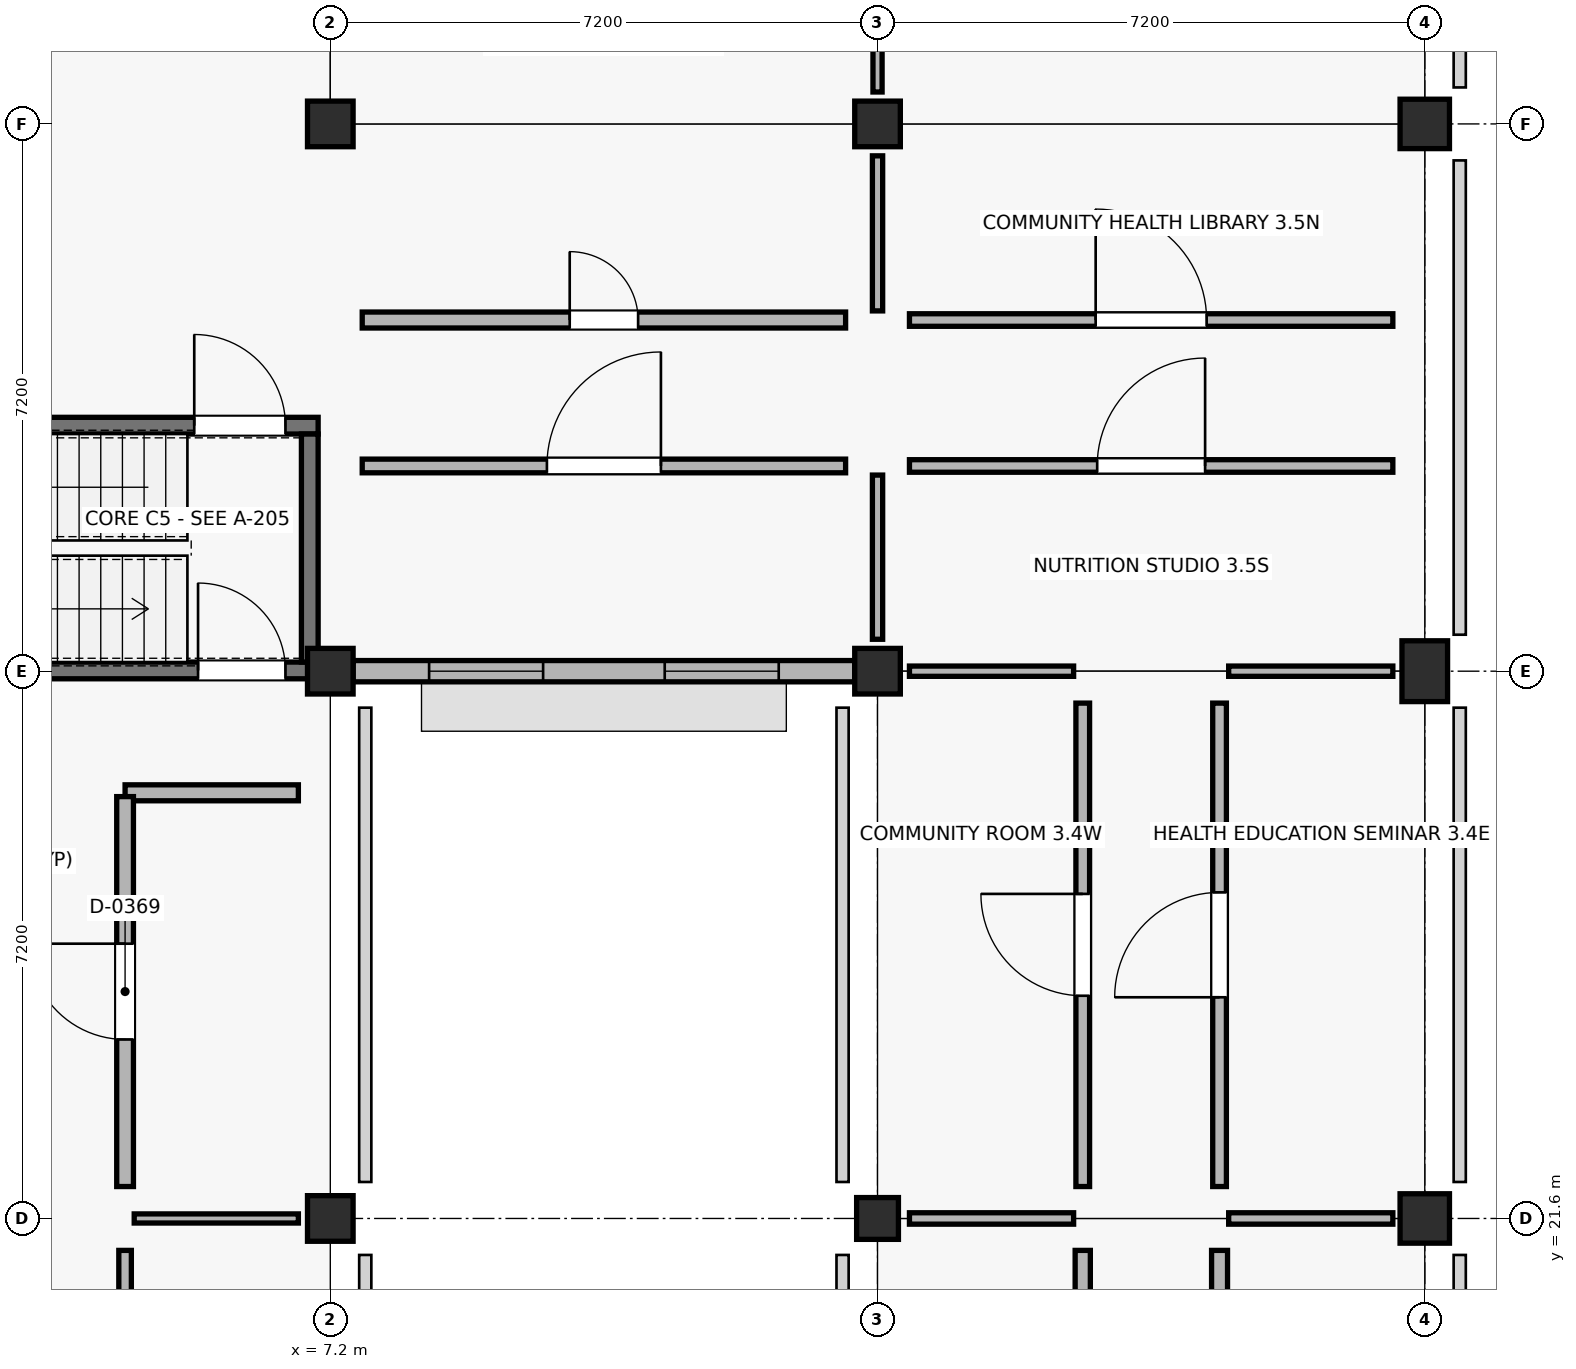
"""IFC4 building model, lengths in metres.
Left out: names, types, materials, properties, quantities, classifications, styles, units other than length and angle.
Written with IfcOpenShell. Run it as: python <this file> out.ifc"""

import sys

from ifc_helpers import new_model, si_unit, direction, frame, frame_2d, origin, origin_2d, place, context, subcontext, project, spatial, rectangle, circle, extrude, element, fill, save


model = new_model("IFC4")
c1 = context("Model", 3, precision=1e-05, world=origin(), true_north=direction((0.0, 1.0)))
c2 = subcontext(c1, "Body", "Model", "MODEL_VIEW")
j1 = project(units=[si_unit("LENGTHUNIT", "METRE"), si_unit("PLANEANGLEUNIT", "RADIAN")], contexts=[c1])
p1 = place(None, origin())
s1 = spatial("IfcSite", under=j1, at=p1, CompositionType="ELEMENT")
p2 = place(p1, origin())
s2 = spatial("IfcBuilding", under=s1, at=p2, CompositionType="ELEMENT")
p3 = place(p2, frame((0.0, 0.0, 4.5)))
s3 = spatial("IfcBuildingStorey", under=s2, at=p3, CompositionType="ELEMENT", Elevation=4.5)
for number, where, z_axis, x_axis in (
    (1, (7.2, 21.6, 0.0), (0.0, 0.0, 1.0), (1.0, 0.0, 0.0)),
    (2, (7.2, 28.8, 0.0), (0.0, 0.0, 1.0), (1.0, 0.0, 0.0)),
    (3, (7.2, 36.0, 0.0), (0.0, 0.0, 1.0), (1.0, 0.0, 0.0)),
):
    element("IfcColumn", number, at=place(p3, frame(where, z_axis=z_axis, x_axis=x_axis)), inside=s3, PredefinedType="COLUMN", context=c2, shape_type="SweptSolid", body=[
        extrude(rectangle(XDim=0.6, YDim=0.6, at=origin_2d()), origin(), (0.0, 0.0, 1.0), 4.5),
    ])
p4 = place(p3, frame((14.4, 21.6, 0.0), z_axis=(0.0, 0.0, 1.0), x_axis=(1.0, 0.0, 0.0)))
e4 = element("IfcColumn", 4, at=p4, inside=s3, PredefinedType="COLUMN", context=c2, shape_type="SweptSolid", body=[
    extrude(rectangle(XDim=0.55, YDim=0.55, at=origin_2d()), origin(), (0.0, 0.0, 1.0), 4.5),
])
for number, where, z_axis, x_axis in (
    (5, (14.4, 28.8, 0.0), (0.0, 0.0, 1.0), (1.0, 0.0, 0.0)),
    (6, (14.4, 36.0, 0.0), (0.0, 0.0, 1.0), (1.0, 0.0, 0.0)),
):
    element("IfcColumn", number, at=place(p3, frame(where, z_axis=z_axis, x_axis=x_axis)), inside=s3, PredefinedType="COLUMN", context=c2, shape_type="SweptSolid", body=[
        extrude(rectangle(XDim=0.6, YDim=0.6, at=origin_2d()), origin(), (0.0, 0.0, 1.0), 4.5),
    ])
p5 = place(p3, frame((21.6, 21.6, 0.0), z_axis=(0.0, 0.0, 1.0), x_axis=(1.0, 0.0, 0.0)))
e7 = element("IfcColumn", 7, at=p5, inside=s3, PredefinedType="COLUMN", context=c2, shape_type="SweptSolid", body=[
    extrude(circle(Radius=0.325, at=origin_2d()), origin(), (0.0, 0.0, 1.0), 4.5),
])
p6 = place(p3, frame((21.6, 28.8, 0.0), z_axis=(0.0, 0.0, 1.0), x_axis=(1.0, 0.0, 0.0)))
e8 = element("IfcColumn", 8, at=p6, inside=s3, PredefinedType="PILASTER", context=c2, shape_type="SweptSolid", body=[
    extrude(rectangle(XDim=0.6, YDim=0.8, at=origin_2d()), origin(), (0.0, 0.0, 1.0), 4.5),
])
p7 = place(p3, frame((21.6, 36.0, 0.0), z_axis=(0.0, 0.0, 1.0), x_axis=(1.0, 0.0, 0.0)))
e9 = element("IfcColumn", 9, at=p7, inside=s3, PredefinedType="COLUMN", context=c2, shape_type="SweptSolid", body=[
    extrude(circle(Radius=0.325, at=origin_2d()), origin(), (0.0, 0.0, 1.0), 4.5),
])
p8 = place(p3, frame((7.5, 28.8, 0.0), z_axis=(0.0, 0.0, 1.0), x_axis=(1.0, 0.0, 0.0)))
e10 = element("IfcWall", 10, at=p8, inside=s3, PredefinedType="STANDARD", context=c2, shape_type="SweptSolid", body=[
    extrude(rectangle(XDim=6.6, YDim=0.28, at=frame_2d((3.3, 0.0))), origin(), (0.0, 0.0, 1.0), 3.47),
])
p9 = place(p8, frame((1.0, 0.0, 0.9)))
e11 = element("IfcOpeningElement", 11, at=p9, cuts=e10, PredefinedType="OPENING", context=c2, shape_type="SweptSolid", body=[
    extrude(rectangle(XDim=1.5, YDim=1.5, at=frame_2d((0.75, 0.75))), frame((0.0, 0.15, 0.0), z_axis=(0.0, -1.0, 0.0), x_axis=(1.0, 0.0, 0.0)), (0.0, 0.0, 1.0), 0.3),
])
p10 = place(p8, frame((4.1, 0.0, 0.9)))
e12 = element("IfcOpeningElement", 12, at=p10, cuts=e10, PredefinedType="OPENING", context=c2, shape_type="SweptSolid", body=[
    extrude(rectangle(XDim=1.5, YDim=1.5, at=frame_2d((0.75, 0.75))), frame((0.0, 0.15, 0.0), z_axis=(0.0, -1.0, 0.0), x_axis=(1.0, 0.0, 0.0)), (0.0, 0.0, 1.0), 0.3),
])
p11 = place(p3, frame((0.16, 28.81, 0.0), z_axis=(0.0, 0.0, 1.0), x_axis=(1.0, 0.0, 0.0)))
e13 = element("IfcWall", 13, at=p11, inside=s3, PredefinedType="SHEAR", context=c2, shape_type="SweptSolid", body=[
    extrude(rectangle(XDim=6.88, YDim=0.22, at=frame_2d((3.44, 0.0))), origin(), (0.0, 0.0, 1.0), 4.22),
])
p12 = place(p11, frame((5.3, 0.0, 0.0)))
e14 = element("IfcOpeningElement", 14, at=p12, cuts=e13, PredefinedType="OPENING", context=c2, shape_type="SweptSolid", body=[
    extrude(rectangle(XDim=1.15, YDim=2.15, at=frame_2d((0.575, 1.075))), frame((0.0, 0.12, 0.0), z_axis=(0.0, -1.0, 0.0), x_axis=(1.0, 0.0, 0.0)), (0.0, 0.0, 1.0), 0.24),
])
p13 = place(p3, frame((0.16, 32.03, 0.0), z_axis=(0.0, 0.0, 1.0), x_axis=(1.0, 0.0, 0.0)))
e15 = element("IfcWall", 15, at=p13, inside=s3, PredefinedType="SHEAR", context=c2, shape_type="SweptSolid", body=[
    extrude(rectangle(XDim=6.88, YDim=0.22, at=frame_2d((3.44, 0.0))), origin(), (0.0, 0.0, 1.0), 4.22),
])
p14 = place(p13, frame((5.25, 0.0, 0.0)))
e16 = element("IfcOpeningElement", 16, at=p14, cuts=e15, PredefinedType="OPENING", context=c2, shape_type="SweptSolid", body=[
    extrude(rectangle(XDim=1.2, YDim=2.15, at=frame_2d((0.6, 1.075))), frame((0.0, 0.12, 0.0), z_axis=(0.0, -1.0, 0.0), x_axis=(1.0, 0.0, 0.0)), (0.0, 0.0, 1.0), 0.24),
])
p15 = place(p3, frame((6.93, 28.92, 0.0), z_axis=(0.0, 0.0, 1.0), x_axis=(0.0, 1.0, 0.0)))
e17 = element("IfcWall", 17, at=p15, inside=s3, PredefinedType="SHEAR", context=c2, shape_type="SweptSolid", body=[
    extrude(rectangle(XDim=3.0, YDim=0.22, at=frame_2d((1.5, 0.0))), origin(), (0.0, 0.0, 1.0), 4.22),
])
p16 = place(p3, frame((4.5, 14.82, 0.0), z_axis=(0.0, 0.0, 1.0), x_axis=(0.0, 1.0, 0.0)))
e18 = element("IfcWall", 18, at=p16, inside=s3, PredefinedType="PARTITIONING", context=c2, shape_type="SweptSolid", body=[
    extrude(rectangle(XDim=6.36, YDim=0.165, at=frame_2d((3.18, 0.0))), origin(), (0.0, 0.0, 1.0), 3.36),
])
p17 = place(p16, frame((2.59, 0.0, 0.0)))
e19 = element("IfcOpeningElement", 19, at=p17, cuts=e18, PredefinedType="OPENING", context=c2, shape_type="SweptSolid", body=[
    extrude(rectangle(XDim=1.18, YDim=2.04, at=frame_2d((0.59, 1.02))), frame((0.0, 0.093, 0.0), z_axis=(0.0, -1.0, 0.0), x_axis=(1.0, 0.0, 0.0)), (0.0, 0.0, 1.0), 0.185),
])
p18 = place(p3, frame((4.62, 21.6, 0.0), z_axis=(0.0, 0.0, 1.0), x_axis=(1.0, 0.0, 0.0)))
e20 = element("IfcWall", 20, at=p18, inside=s3, PredefinedType="PARTITIONING", context=c2, shape_type="SweptSolid", body=[
    extrude(rectangle(XDim=2.16, YDim=0.12, at=frame_2d((1.08, 0.0))), origin(), (0.0, 0.0, 1.0), 3.36),
])
p19 = place(p3, frame((4.5, 27.2, 0.0), z_axis=(0.0, 0.0, 1.0), x_axis=(1.0, 0.0, 0.0)))
e21 = element("IfcWall", 21, at=p19, inside=s3, PredefinedType="PLUMBINGWALL", context=c2, shape_type="SweptSolid", body=[
    extrude(rectangle(XDim=2.28, YDim=0.21, at=frame_2d((1.14, 0.0))), origin(), (0.0, 0.0, 1.0), 3.36),
])
p20 = place(p3, frame((4.5, 22.02, 0.0), z_axis=(0.0, 0.0, 1.0), x_axis=(0.0, 1.0, 0.0)))
e22 = element("IfcWall", 22, at=p20, inside=s3, PredefinedType="SOLIDWALL", context=c2, shape_type="SweptSolid", body=[
    extrude(rectangle(XDim=5.13, YDim=0.22, at=frame_2d((2.565, 0.0))), origin(), (0.0, 0.0, 1.0), 3.36),
])
p21 = place(p20, frame((1.935, 0.0, 0.0)))
e23 = element("IfcOpeningElement", 23, at=p21, cuts=e22, PredefinedType="OPENING", context=c2, shape_type="SweptSolid", body=[
    extrude(rectangle(XDim=1.26, YDim=2.04, at=frame_2d((0.63, 1.02))), frame((0.0, 0.12, 0.0), z_axis=(0.0, -1.0, 0.0), x_axis=(1.0, 0.0, 0.0)), (0.0, 0.0, 1.0), 0.24),
])
p22 = place(p3, frame((7.62, 31.5, 0.0), z_axis=(0.0, 0.0, 1.0), x_axis=(1.0, 0.0, 0.0)))
e24 = element("IfcWall", 24, at=p22, inside=s3, PredefinedType="PARTITIONING", context=c2, shape_type="SweptSolid", body=[
    extrude(rectangle(XDim=6.36, YDim=0.18, at=frame_2d((3.18, 0.0))), origin(), (0.0, 0.0, 1.0), 3.36),
])
p23 = place(p22, frame((2.43, 0.0, 0.0)))
e25 = element("IfcOpeningElement", 25, at=p23, cuts=e24, PredefinedType="OPENING", context=c2, shape_type="SweptSolid", body=[
    extrude(rectangle(XDim=1.5, YDim=2.04, at=frame_2d((0.75, 1.02))), frame((0.0, 0.1, 0.0), z_axis=(0.0, -1.0, 0.0), x_axis=(1.0, 0.0, 0.0)), (0.0, 0.0, 1.0), 0.2),
])
p24 = place(p3, frame((14.4, 29.22, 0.0), z_axis=(0.0, 0.0, 1.0), x_axis=(0.0, 1.0, 0.0)))
e26 = element("IfcWall", 26, at=p24, inside=s3, PredefinedType="PARTITIONING", context=c2, shape_type="SweptSolid", body=[
    extrude(rectangle(XDim=2.16, YDim=0.135, at=frame_2d((1.08, 0.0))), origin(), (0.0, 0.0, 1.0), 3.36),
])
p25 = place(p3, frame((7.62, 33.42, 0.0), z_axis=(0.0, 0.0, 1.0), x_axis=(1.0, 0.0, 0.0)))
e27 = element("IfcWall", 27, at=p25, inside=s3, PredefinedType="PLUMBINGWALL", context=c2, shape_type="SweptSolid", body=[
    extrude(rectangle(XDim=6.36, YDim=0.21, at=frame_2d((3.18, 0.0))), origin(), (0.0, 0.0, 1.0), 3.36),
])
p26 = place(p25, frame((2.73, 0.0, 0.0)))
e28 = element("IfcOpeningElement", 28, at=p26, cuts=e27, PredefinedType="OPENING", context=c2, shape_type="SweptSolid", body=[
    extrude(rectangle(XDim=0.9, YDim=2.09, at=frame_2d((0.45, 1.045))), frame((0.0, 0.115, 0.0), z_axis=(0.0, -1.0, 0.0), x_axis=(1.0, 0.0, 0.0)), (0.0, 0.0, 1.0), 0.23),
])
p27 = place(p3, frame((14.4, 33.54, 0.0), z_axis=(0.0, 0.0, 1.0), x_axis=(0.0, 1.0, 0.0)))
e29 = element("IfcWall", 29, at=p27, inside=s3, PredefinedType="PARTITIONING", context=c2, shape_type="SweptSolid", body=[
    extrude(rectangle(XDim=2.04, YDim=0.135, at=frame_2d((1.02, 0.0))), origin(), (0.0, 0.0, 1.0), 3.36),
])
p28 = place(p3, frame((14.4, 36.42, 0.0), z_axis=(0.0, 0.0, 1.0), x_axis=(0.0, 1.0, 0.0)))
e30 = element("IfcWall", 30, at=p28, inside=s3, PredefinedType="PARTITIONING", context=c2, shape_type="SweptSolid", body=[
    extrude(rectangle(XDim=2.16, YDim=0.12, at=frame_2d((1.08, 0.0))), origin(), (0.0, 0.0, 1.0), 3.36),
])
p29 = place(p3, frame((17.1, 14.82, 0.0), z_axis=(0.0, 0.0, 1.0), x_axis=(0.0, 1.0, 0.0)))
e31 = element("IfcWall", 31, at=p29, inside=s3, PredefinedType="SOLIDWALL", context=c2, shape_type="SweptSolid", body=[
    extrude(rectangle(XDim=6.36, YDim=0.2, at=frame_2d((3.18, 0.0))), origin(), (0.0, 0.0, 1.0), 3.36),
])
p30 = place(p29, frame((2.55, 0.0, 0.0)))
e32 = element("IfcOpeningElement", 32, at=p30, cuts=e31, PredefinedType="OPENING", context=c2, shape_type="SweptSolid", body=[
    extrude(rectangle(XDim=1.26, YDim=2.09, at=frame_2d((0.63, 1.045))), frame((0.0, 0.11, 0.0), z_axis=(0.0, -1.0, 0.0), x_axis=(1.0, 0.0, 0.0)), (0.0, 0.0, 1.0), 0.22),
])
p31 = place(p3, frame((14.82, 21.6, 0.0), z_axis=(0.0, 0.0, 1.0), x_axis=(1.0, 0.0, 0.0)))
e33 = element("IfcWall", 33, at=p31, inside=s3, PredefinedType="PARTITIONING", context=c2, shape_type="SweptSolid", body=[
    extrude(rectangle(XDim=2.16, YDim=0.15, at=frame_2d((1.08, 0.0))), origin(), (0.0, 0.0, 1.0), 3.36),
])
p32 = place(p3, frame((18.9, 14.82, 0.0), z_axis=(0.0, 0.0, 1.0), x_axis=(0.0, 1.0, 0.0)))
e34 = element("IfcWall", 34, at=p32, inside=s3, PredefinedType="PLUMBINGWALL", context=c2, shape_type="SweptSolid", body=[
    extrude(rectangle(XDim=6.36, YDim=0.21, at=frame_2d((3.18, 0.0))), origin(), (0.0, 0.0, 1.0), 3.36),
])
p33 = place(p32, frame((2.53, 0.0, 0.0)))
e35 = element("IfcOpeningElement", 35, at=p33, cuts=e34, PredefinedType="OPENING", context=c2, shape_type="SweptSolid", body=[
    extrude(rectangle(XDim=1.3, YDim=2.09, at=frame_2d((0.65, 1.045))), frame((0.0, 0.115, 0.0), z_axis=(0.0, -1.0, 0.0), x_axis=(1.0, 0.0, 0.0)), (0.0, 0.0, 1.0), 0.23),
])
p34 = place(p3, frame((19.02, 21.6, 0.0), z_axis=(0.0, 0.0, 1.0), x_axis=(1.0, 0.0, 0.0)))
e36 = element("IfcWall", 36, at=p34, inside=s3, PredefinedType="PARTITIONING", context=c2, shape_type="SweptSolid", body=[
    extrude(rectangle(XDim=2.16, YDim=0.15, at=frame_2d((1.08, 0.0))), origin(), (0.0, 0.0, 1.0), 3.36),
])
p35 = place(p3, frame((17.1, 22.02, 0.0), z_axis=(0.0, 0.0, 1.0), x_axis=(0.0, 1.0, 0.0)))
e37 = element("IfcWall", 37, at=p35, inside=s3, PredefinedType="PARTITIONING", context=c2, shape_type="SweptSolid", body=[
    extrude(rectangle(XDim=6.36, YDim=0.18, at=frame_2d((3.18, 0.0))), origin(), (0.0, 0.0, 1.0), 3.36),
])
p36 = place(p35, frame((2.51, 0.0, 0.0)))
e38 = element("IfcOpeningElement", 38, at=p36, cuts=e37, PredefinedType="OPENING", context=c2, shape_type="SweptSolid", body=[
    extrude(rectangle(XDim=1.34, YDim=2.09, at=frame_2d((0.67, 1.045))), frame((0.0, 0.1, 0.0), z_axis=(0.0, -1.0, 0.0), x_axis=(1.0, 0.0, 0.0)), (0.0, 0.0, 1.0), 0.2),
])
p37 = place(p3, frame((14.82, 28.8, 0.0), z_axis=(0.0, 0.0, 1.0), x_axis=(1.0, 0.0, 0.0)))
e39 = element("IfcWall", 39, at=p37, inside=s3, PredefinedType="PARTITIONING", context=c2, shape_type="SweptSolid", body=[
    extrude(rectangle(XDim=2.16, YDim=0.135, at=frame_2d((1.08, 0.0))), origin(), (0.0, 0.0, 1.0), 3.36),
])
p38 = place(p3, frame((18.9, 22.02, 0.0), z_axis=(0.0, 0.0, 1.0), x_axis=(0.0, 1.0, 0.0)))
e40 = element("IfcWall", 40, at=p38, inside=s3, PredefinedType="PARTITIONING", context=c2, shape_type="SweptSolid", body=[
    extrude(rectangle(XDim=6.36, YDim=0.18, at=frame_2d((3.18, 0.0))), origin(), (0.0, 0.0, 1.0), 3.36),
])
p39 = place(p38, frame((2.49, 0.0, 0.0)))
e41 = element("IfcOpeningElement", 41, at=p39, cuts=e40, PredefinedType="OPENING", context=c2, shape_type="SweptSolid", body=[
    extrude(rectangle(XDim=1.38, YDim=2.09, at=frame_2d((0.69, 1.045))), frame((0.0, 0.1, 0.0), z_axis=(0.0, -1.0, 0.0), x_axis=(1.0, 0.0, 0.0)), (0.0, 0.0, 1.0), 0.2),
])
p40 = place(p3, frame((19.02, 28.8, 0.0), z_axis=(0.0, 0.0, 1.0), x_axis=(1.0, 0.0, 0.0)))
e42 = element("IfcWall", 42, at=p40, inside=s3, PredefinedType="PARTITIONING", context=c2, shape_type="SweptSolid", body=[
    extrude(rectangle(XDim=2.16, YDim=0.135, at=frame_2d((1.08, 0.0))), origin(), (0.0, 0.0, 1.0), 3.36),
])
p41 = place(p3, frame((14.82, 31.5, 0.0), z_axis=(0.0, 0.0, 1.0), x_axis=(1.0, 0.0, 0.0)))
e43 = element("IfcWall", 43, at=p41, inside=s3, PredefinedType="PARTITIONING", context=c2, shape_type="SweptSolid", body=[
    extrude(rectangle(XDim=6.36, YDim=0.165, at=frame_2d((3.18, 0.0))), origin(), (0.0, 0.0, 1.0), 3.36),
])
p42 = place(p41, frame((2.47, 0.0, 0.0)))
e44 = element("IfcOpeningElement", 44, at=p42, cuts=e43, PredefinedType="OPENING", context=c2, shape_type="SweptSolid", body=[
    extrude(rectangle(XDim=1.42, YDim=2.09, at=frame_2d((0.71, 1.045))), frame((0.0, 0.093, 0.0), z_axis=(0.0, -1.0, 0.0), x_axis=(1.0, 0.0, 0.0)), (0.0, 0.0, 1.0), 0.185),
])
p43 = place(p3, frame((14.82, 33.42, 0.0), z_axis=(0.0, 0.0, 1.0), x_axis=(1.0, 0.0, 0.0)))
e45 = element("IfcWall", 45, at=p43, inside=s3, PredefinedType="PARTITIONING", context=c2, shape_type="SweptSolid", body=[
    extrude(rectangle(XDim=6.36, YDim=0.165, at=frame_2d((3.18, 0.0))), origin(), (0.0, 0.0, 1.0), 3.36),
])
p44 = place(p43, frame((2.45, 0.0, 0.0)))
e46 = element("IfcOpeningElement", 46, at=p44, cuts=e45, PredefinedType="OPENING", context=c2, shape_type="SweptSolid", body=[
    extrude(rectangle(XDim=1.46, YDim=2.09, at=frame_2d((0.73, 1.045))), frame((0.0, 0.093, 0.0), z_axis=(0.0, -1.0, 0.0), x_axis=(1.0, 0.0, 0.0)), (0.0, 0.0, 1.0), 0.185),
])
p45 = place(p9, origin())
e47 = element("IfcWindow", 47, at=p45, inside=s3, PartitioningType="SINGLE_PANEL", PredefinedType="WINDOW", context=c2, shape_type="SweptSolid", body=[
    extrude(rectangle(XDim=1.5, YDim=1.5, at=frame_2d((0.75, 0.75))), frame((0.0, 0.03, 0.0), z_axis=(0.0, -1.0, 0.0), x_axis=(1.0, 0.0, 0.0)), (0.0, 0.0, 1.0), 0.06),
])
fill(e11, e47)
p46 = place(p10, origin())
e48 = element("IfcWindow", 48, at=p46, inside=s3, PartitioningType="SINGLE_PANEL", PredefinedType="WINDOW", context=c2, shape_type="SweptSolid", body=[
    extrude(rectangle(XDim=1.5, YDim=1.5, at=frame_2d((0.75, 0.75))), frame((0.0, 0.03, 0.0), z_axis=(0.0, -1.0, 0.0), x_axis=(1.0, 0.0, 0.0)), (0.0, 0.0, 1.0), 0.06),
])
fill(e12, e48)
p47 = place(p14, origin())
e49 = element("IfcDoor", 49, at=p47, inside=s3, OperationType="SINGLE_SWING_LEFT", PredefinedType="DOOR", context=c2, shape_type="SweptSolid", body=[
    extrude(rectangle(XDim=1.2, YDim=2.15, at=frame_2d((0.6, 1.075))), frame((0.0, 0.025, 0.0), z_axis=(0.0, -1.0, 0.0), x_axis=(1.0, 0.0, 0.0)), (0.0, 0.0, 1.0), 0.05),
])
fill(e16, e49)
p48 = place(p12, origin())
e50 = element("IfcDoor", 50, at=p48, inside=s3, OperationType="SINGLE_SWING_LEFT", PredefinedType="DOOR", context=c2, shape_type="SweptSolid", body=[
    extrude(rectangle(XDim=1.15, YDim=2.15, at=frame_2d((0.575, 1.075))), frame((0.0, 0.025, 0.0), z_axis=(0.0, -1.0, 0.0), x_axis=(1.0, 0.0, 0.0)), (0.0, 0.0, 1.0), 0.05),
])
fill(e14, e50)
p49 = place(p21, origin())
e51 = element("IfcDoor", 51, at=p49, inside=s3, OperationType="SINGLE_SWING_RIGHT", PredefinedType="DOOR", context=c2, shape_type="SweptSolid", body=[
    extrude(rectangle(XDim=1.26, YDim=2.04, at=frame_2d((0.63, 1.02))), frame((0.0, 0.025, 0.0), z_axis=(0.0, -1.0, 0.0), x_axis=(1.0, 0.0, 0.0)), (0.0, 0.0, 1.0), 0.05),
])
fill(e23, e51)
p50 = place(p23, origin())
e52 = element("IfcDoor", 52, at=p50, inside=s3, OperationType="SINGLE_SWING_RIGHT", PredefinedType="DOOR", context=c2, shape_type="SweptSolid", body=[
    extrude(rectangle(XDim=1.5, YDim=2.04, at=frame_2d((0.75, 1.02))), frame((0.0, 0.025, 0.0), z_axis=(0.0, -1.0, 0.0), x_axis=(1.0, 0.0, 0.0)), (0.0, 0.0, 1.0), 0.05),
])
fill(e25, e52)
p51 = place(p26, origin())
e53 = element("IfcDoor", 53, at=p51, inside=s3, OperationType="SINGLE_SWING_LEFT", PredefinedType="DOOR", context=c2, shape_type="SweptSolid", body=[
    extrude(rectangle(XDim=0.9, YDim=2.09, at=frame_2d((0.45, 1.045))), frame((0.0, 0.025, 0.0), z_axis=(0.0, -1.0, 0.0), x_axis=(1.0, 0.0, 0.0)), (0.0, 0.0, 1.0), 0.05),
])
fill(e28, e53)
p52 = place(p36, origin())
e54 = element("IfcDoor", 54, at=p52, inside=s3, OperationType="SINGLE_SWING_RIGHT", PredefinedType="DOOR", context=c2, shape_type="SweptSolid", body=[
    extrude(rectangle(XDim=1.34, YDim=2.09, at=frame_2d((0.67, 1.045))), frame((0.0, 0.025, 0.0), z_axis=(0.0, -1.0, 0.0), x_axis=(1.0, 0.0, 0.0)), (0.0, 0.0, 1.0), 0.05),
])
fill(e38, e54)
p53 = place(p39, origin())
e55 = element("IfcDoor", 55, at=p53, inside=s3, OperationType="SINGLE_SWING_LEFT", PredefinedType="DOOR", context=c2, shape_type="SweptSolid", body=[
    extrude(rectangle(XDim=1.38, YDim=2.09, at=frame_2d((0.69, 1.045))), frame((0.0, 0.025, 0.0), z_axis=(0.0, -1.0, 0.0), x_axis=(1.0, 0.0, 0.0)), (0.0, 0.0, 1.0), 0.05),
])
fill(e41, e55)
p54 = place(p42, origin())
e56 = element("IfcDoor", 56, at=p54, inside=s3, OperationType="SINGLE_SWING_RIGHT", PredefinedType="DOOR", context=c2, shape_type="SweptSolid", body=[
    extrude(rectangle(XDim=1.42, YDim=2.09, at=frame_2d((0.71, 1.045))), frame((0.0, 0.025, 0.0), z_axis=(0.0, -1.0, 0.0), x_axis=(1.0, 0.0, 0.0)), (0.0, 0.0, 1.0), 0.05),
])
fill(e44, e56)
p55 = place(p44, origin())
e57 = element("IfcDoor", 57, at=p55, inside=s3, OperationType="SINGLE_SWING_LEFT", PredefinedType="DOOR", context=c2, shape_type="SweptSolid", body=[
    extrude(rectangle(XDim=1.46, YDim=2.09, at=frame_2d((0.73, 1.045))), frame((0.0, 0.025, 0.0), z_axis=(0.0, -1.0, 0.0), x_axis=(1.0, 0.0, 0.0)), (0.0, 0.0, 1.0), 0.05),
])
fill(e46, e57)
save(model, sys.argv[1])
